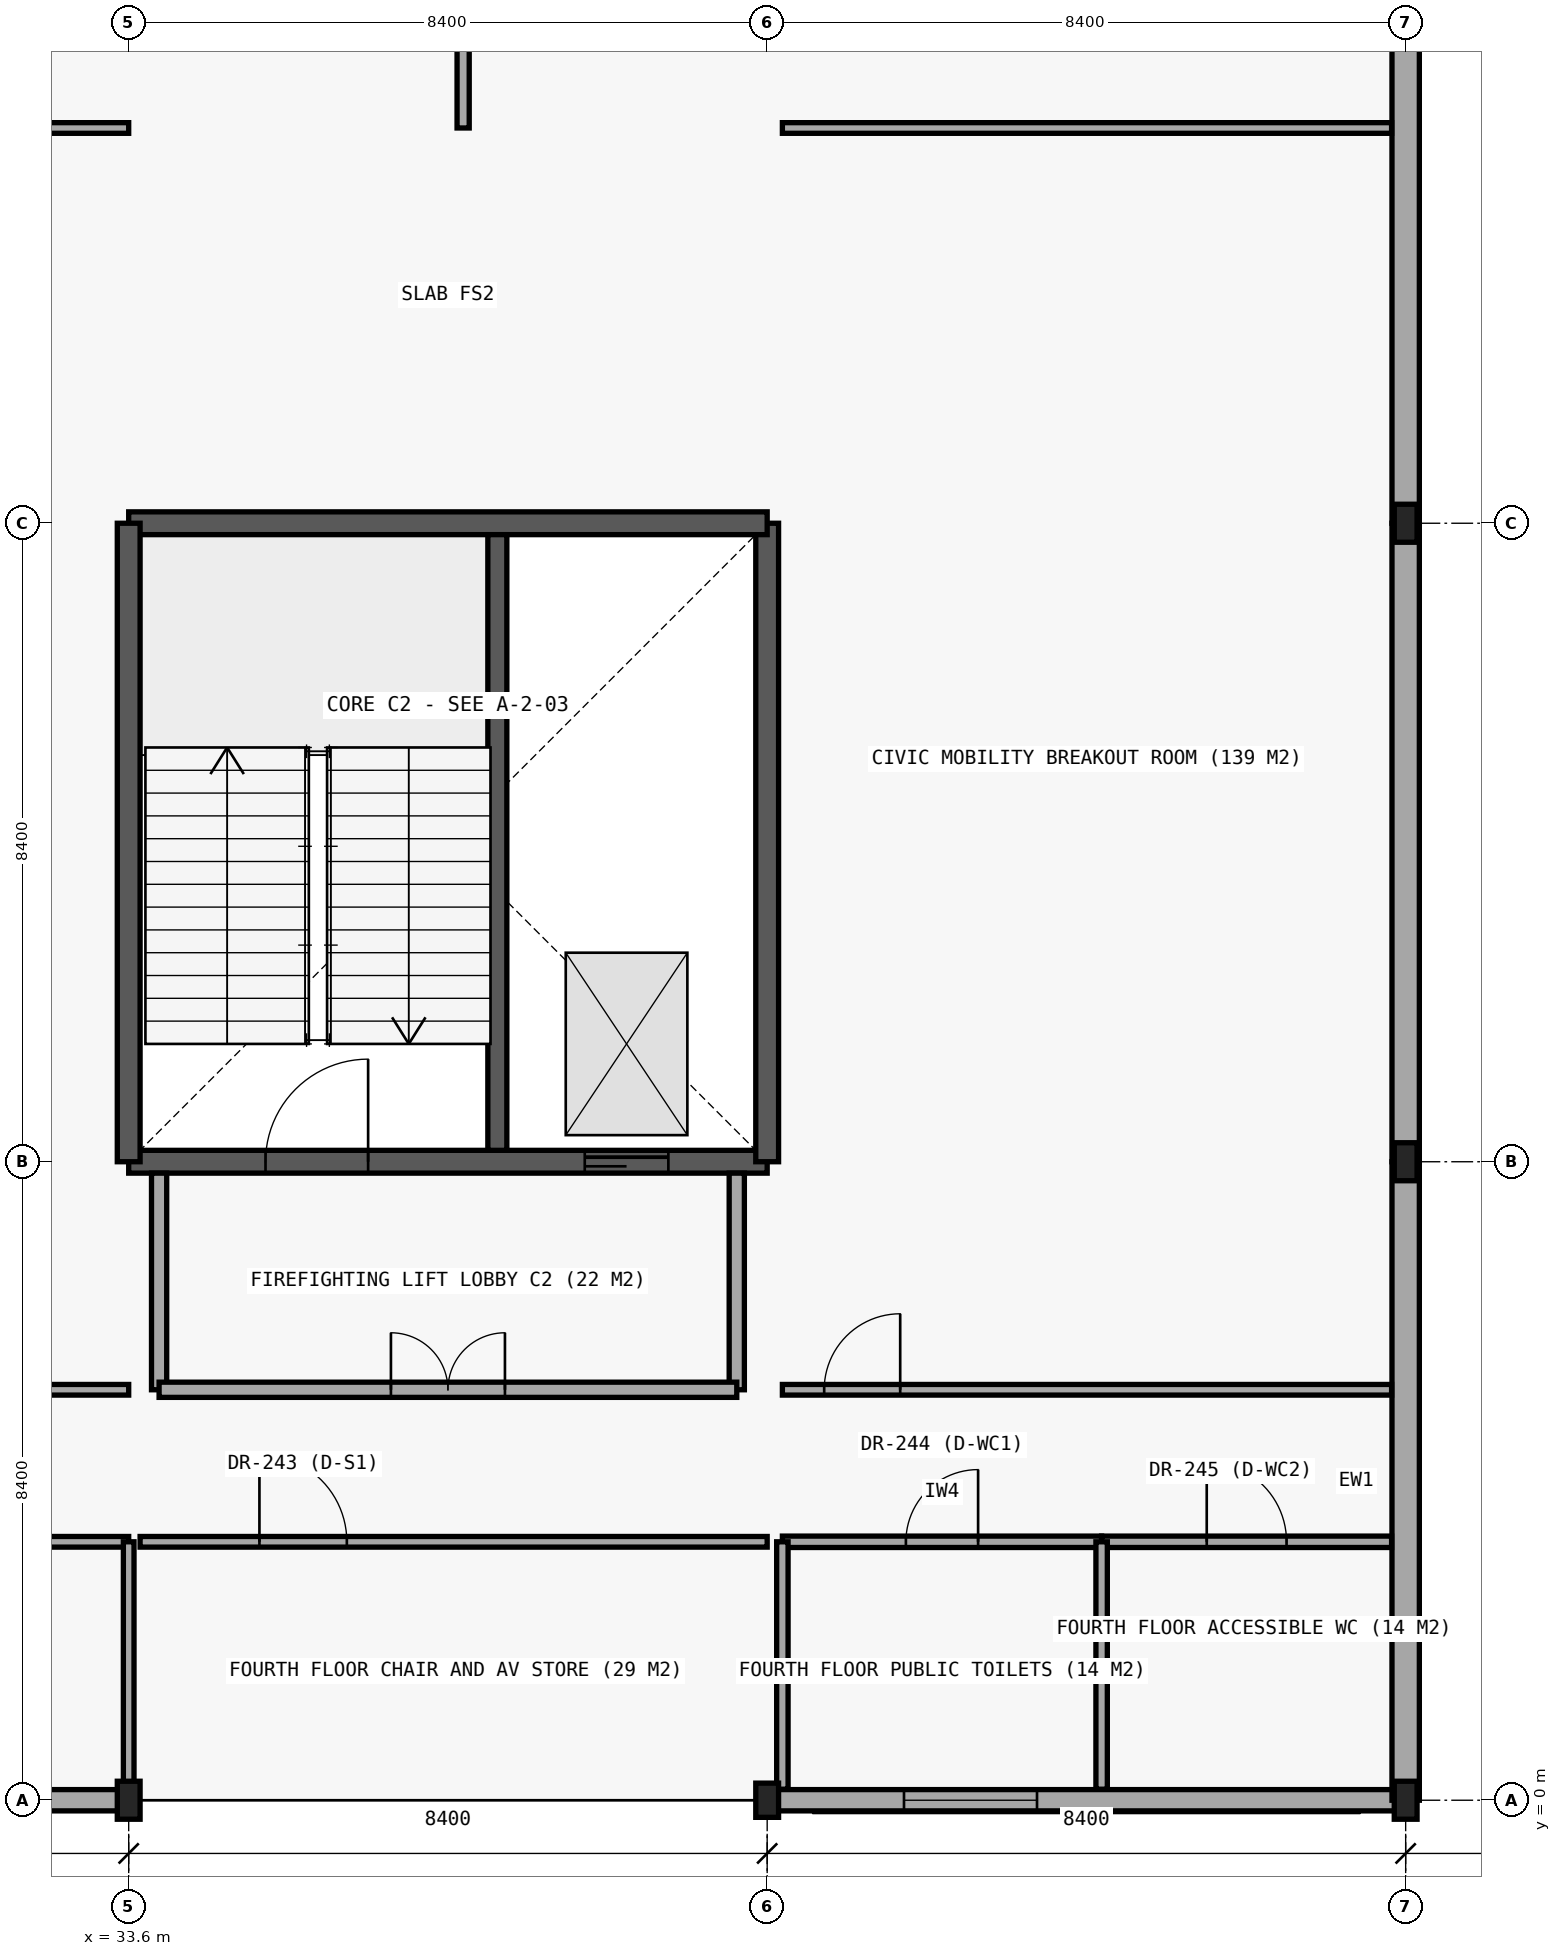
"""IFC4 building model, lengths in metres.
Left out: names, types, materials, properties, quantities, classifications, styles, units other than length and angle.
Written with IfcOpenShell. Run it as: python <this file> out.ifc"""

import sys

from ifc_helpers import new_model, si_unit, direction, frame, frame_2d, origin, origin_2d, place, context, subcontext, project, spatial, rectangle, i_section, extrude, element, fill, save


model = new_model("IFC4")
c1 = context("Model", 3, precision=1e-05, world=origin(), true_north=direction((0.0, 1.0)))
c2 = subcontext(c1, "Body", "Model", "MODEL_VIEW")
j1 = project(units=[si_unit("LENGTHUNIT", "METRE"), si_unit("PLANEANGLEUNIT", "RADIAN")], contexts=[c1])
p1 = place(None, origin())
s1 = spatial("IfcSite", under=j1, at=p1, CompositionType="ELEMENT")
p2 = place(p1, origin())
s2 = spatial("IfcBuilding", under=s1, at=p2, CompositionType="ELEMENT")
p3 = place(p2, frame((0.0, 0.0, 17.4)))
s3 = spatial("IfcBuildingStorey", under=s2, at=p3, CompositionType="ELEMENT", Elevation=17.4)
p4 = place(p3, frame((33.6, 8.4, 0.0), z_axis=(0.0, 0.0, 1.0), x_axis=(1.0, 0.0, 0.0)))
e1 = element("IfcWall", 1, at=p4, inside=s3, PredefinedType="SHEAR", context=c2, shape_type="SweptSolid", body=[
    extrude(rectangle(XDim=8.4, YDim=0.3, at=frame_2d((4.2, 0.0))), origin(), (0.0, 0.0, 1.0), 4.2),
])
p5 = place(p4, frame((1.8, 0.0, 0.0)))
e2 = element("IfcOpeningElement", 2, at=p5, cuts=e1, PredefinedType="OPENING", context=c2, shape_type="SweptSolid", body=[
    extrude(rectangle(XDim=1.35, YDim=2.2, at=frame_2d((0.675, 1.1))), frame((0.0, 0.16, 0.0), z_axis=(0.0, -1.0, 0.0), x_axis=(1.0, 0.0, 0.0)), (0.0, 0.0, 1.0), 0.32),
])
p6 = place(p4, frame((6.0, 0.0, 0.0)))
e3 = element("IfcOpeningElement", 3, at=p6, cuts=e1, PredefinedType="OPENING", context=c2, shape_type="SweptSolid", body=[
    extrude(rectangle(XDim=1.1, YDim=2.2, at=frame_2d((0.55, 1.1))), frame((0.0, 0.16, 0.0), z_axis=(0.0, -1.0, 0.0), x_axis=(1.0, 0.0, 0.0)), (0.0, 0.0, 1.0), 0.32),
])
p7 = place(p3, frame((42.0, 8.4, 0.0), z_axis=(0.0, 0.0, 1.0), x_axis=(0.0, 1.0, 0.0)))
e4 = element("IfcWall", 4, at=p7, inside=s3, PredefinedType="SHEAR", context=c2, shape_type="SweptSolid", body=[
    extrude(rectangle(XDim=8.4, YDim=0.3, at=frame_2d((4.2, 0.0))), origin(), (0.0, 0.0, 1.0), 4.2),
])
p8 = place(p3, frame((42.0, 16.8, 0.0), z_axis=(0.0, 0.0, 1.0), x_axis=(-1.0, 0.0, 0.0)))
e5 = element("IfcWall", 5, at=p8, inside=s3, PredefinedType="SHEAR", context=c2, shape_type="SweptSolid", body=[
    extrude(rectangle(XDim=8.4, YDim=0.3, at=frame_2d((4.2, 0.0))), origin(), (0.0, 0.0, 1.0), 4.2),
])
p9 = place(p3, frame((33.6, 16.8, 0.0), z_axis=(0.0, 0.0, 1.0), x_axis=(0.0, -1.0, 0.0)))
e6 = element("IfcWall", 6, at=p9, inside=s3, PredefinedType="SHEAR", context=c2, shape_type="SweptSolid", body=[
    extrude(rectangle(XDim=8.4, YDim=0.3, at=frame_2d((4.2, 0.0))), origin(), (0.0, 0.0, 1.0), 4.2),
])
p10 = place(p3, frame((38.45, 8.55, 0.0), z_axis=(0.0, 0.0, 1.0), x_axis=(0.0, 1.0, 0.0)))
e7 = element("IfcWall", 7, at=p10, inside=s3, PredefinedType="SHEAR", context=c2, shape_type="SweptSolid", body=[
    extrude(rectangle(XDim=8.1, YDim=0.25, at=frame_2d((4.05, 0.0))), origin(), (0.0, 0.0, 1.0), 4.2),
])
p11 = place(p3, frame((33.6, 0.0, 0.0), z_axis=(0.0, 0.0, 1.0), x_axis=(1.0, 0.0, 0.0)))
e8 = element("IfcColumn", 8, at=p11, inside=s3, PredefinedType="COLUMN", context=c2, shape_type="SweptSolid", body=[
    extrude(i_section(OverallWidth=0.3, OverallDepth=0.5, WebThickness=0.014, FlangeThickness=0.028, FilletRadius=0.027, at=origin_2d()), origin(), (0.0, 0.0, 1.0), 4.2),
])
p12 = place(p3, frame((42.0, 0.0, 0.0), z_axis=(0.0, 0.0, 1.0), x_axis=(1.0, 0.0, 0.0)))
e9 = element("IfcColumn", 9, at=p12, inside=s3, PredefinedType="COLUMN", context=c2, shape_type="SweptSolid", body=[
    extrude(i_section(OverallWidth=0.3, OverallDepth=0.45, WebThickness=0.014, FlangeThickness=0.026, FilletRadius=0.027, at=origin_2d()), origin(), (0.0, 0.0, 1.0), 4.2),
])
for number, where, z_axis, x_axis in (
    (10, (50.4, 0.0, 0.0), (0.0, 0.0, 1.0), (1.0, 0.0, 0.0)),
    (11, (50.4, 8.4, 0.0), (0.0, 0.0, 1.0), (1.0, 0.0, 0.0)),
    (12, (50.4, 16.8, 0.0), (0.0, 0.0, 1.0), (1.0, 0.0, 0.0)),
):
    element("IfcColumn", number, at=place(p3, frame(where, z_axis=z_axis, x_axis=x_axis)), inside=s3, PredefinedType="COLUMN", context=c2, shape_type="SweptSolid", body=[
        extrude(i_section(OverallWidth=0.3, OverallDepth=0.5, WebThickness=0.014, FlangeThickness=0.028, FilletRadius=0.027, at=origin_2d()), origin(), (0.0, 0.0, 1.0), 3.958),
    ])
p13 = place(p3, frame((25.2, 0.0, 0.0), z_axis=(0.0, 0.0, 1.0), x_axis=(1.0, 0.0, 0.0)))
e13 = element("IfcWall", 13, at=p13, inside=s3, PredefinedType="STANDARD", context=c2, shape_type="SweptSolid", body=[
    extrude(rectangle(XDim=8.4, YDim=0.28, at=frame_2d((4.2, 0.0))), origin(), (0.0, 0.0, 1.0), 3.62),
])
p14 = place(p3, frame((42.0, 0.0, 0.0), z_axis=(0.0, 0.0, 1.0), x_axis=(1.0, 0.0, 0.0)))
e14 = element("IfcWall", 14, at=p14, inside=s3, PredefinedType="STANDARD", context=c2, shape_type="SweptSolid", body=[
    extrude(rectangle(XDim=8.4, YDim=0.28, at=frame_2d((4.2, 0.0))), origin(), (0.0, 0.0, 1.0), 3.62),
])
p15 = place(p14, frame((1.8, 0.0, 0.85)))
e15 = element("IfcOpeningElement", 15, at=p15, cuts=e14, PredefinedType="OPENING", context=c2, shape_type="SweptSolid", body=[
    extrude(rectangle(XDim=1.75, YDim=2.45, at=frame_2d((0.875, 1.225))), frame((0.0, 0.15, 0.0), z_axis=(0.0, -1.0, 0.0), x_axis=(1.0, 0.0, 0.0)), (0.0, 0.0, 1.0), 0.3),
])
p16 = place(p3, frame((50.4, 0.0, 0.0), z_axis=(0.0, 0.0, 1.0), x_axis=(0.0, 1.0, 0.0)))
e16 = element("IfcWall", 16, at=p16, inside=s3, PredefinedType="STANDARD", context=c2, shape_type="SweptSolid", body=[
    extrude(rectangle(XDim=8.4, YDim=0.36, at=frame_2d((4.2, 0.0))), origin(), (0.0, 0.0, 1.0), 3.62),
])
p17 = place(p3, frame((50.4, 8.4, 0.0), z_axis=(0.0, 0.0, 1.0), x_axis=(0.0, 1.0, 0.0)))
e17 = element("IfcWall", 17, at=p17, inside=s3, PredefinedType="STANDARD", context=c2, shape_type="SweptSolid", body=[
    extrude(rectangle(XDim=8.4, YDim=0.36, at=frame_2d((4.2, 0.0))), origin(), (0.0, 0.0, 1.0), 3.62),
])
p18 = place(p3, frame((50.4, 16.8, 0.0), z_axis=(0.0, 0.0, 1.0), x_axis=(0.0, 1.0, 0.0)))
e18 = element("IfcWall", 18, at=p18, inside=s3, PredefinedType="STANDARD", context=c2, shape_type="SweptSolid", body=[
    extrude(rectangle(XDim=8.4, YDim=0.36, at=frame_2d((4.2, 0.0))), origin(), (0.0, 0.0, 1.0), 3.62),
])
p19 = place(p3, frame((34.0, 5.4, 0.0), z_axis=(0.0, 0.0, 1.0), x_axis=(0.0, 1.0, 0.0)))
e19 = element("IfcWall", 19, at=p19, inside=s3, PredefinedType="PARTITIONING", context=c2, shape_type="SweptSolid", body=[
    extrude(rectangle(XDim=2.85, YDim=0.2, at=frame_2d((1.425, 0.0))), origin(), (0.0, 0.0, 1.0), 3.49),
])
p20 = place(p3, frame((41.6, 5.4, 0.0), z_axis=(0.0, 0.0, 1.0), x_axis=(0.0, 1.0, 0.0)))
e20 = element("IfcWall", 20, at=p20, inside=s3, PredefinedType="PARTITIONING", context=c2, shape_type="SweptSolid", body=[
    extrude(rectangle(XDim=2.85, YDim=0.2, at=frame_2d((1.425, 0.0))), origin(), (0.0, 0.0, 1.0), 3.52),
])
p21 = place(p3, frame((34.0, 5.4, 0.0), z_axis=(0.0, 0.0, 1.0), x_axis=(1.0, 0.0, 0.0)))
e21 = element("IfcWall", 21, at=p21, inside=s3, PredefinedType="PARTITIONING", context=c2, shape_type="SweptSolid", body=[
    extrude(rectangle(XDim=7.6, YDim=0.2, at=frame_2d((3.8, 0.0))), origin(), (0.0, 0.0, 1.0), 3.52),
])
p22 = place(p21, frame((3.05, 0.0, 0.0)))
e22 = element("IfcOpeningElement", 22, at=p22, cuts=e21, PredefinedType="OPENING", context=c2, shape_type="SweptSolid", body=[
    extrude(rectangle(XDim=1.5, YDim=2.2, at=frame_2d((0.75, 1.1))), frame((0.0, 0.11, 0.0), z_axis=(0.0, -1.0, 0.0), x_axis=(1.0, 0.0, 0.0)), (0.0, 0.0, 1.0), 0.22),
])
p23 = place(p3, frame((19.8, 3.4, 0.0), z_axis=(0.0, 0.0, 1.0), x_axis=(1.0, 0.0, 0.0)))
e23 = element("IfcWall", 23, at=p23, inside=s3, PredefinedType="PARTITIONING", context=c2, shape_type="SweptSolid", body=[
    extrude(rectangle(XDim=13.8, YDim=0.14, at=frame_2d((6.9, 0.0))), origin(), (0.0, 0.0, 1.0), 3.5),
])
p24 = place(p23, frame((7.87, 0.0, 0.0)))
e24 = element("IfcOpeningElement", 24, at=p24, cuts=e23, PredefinedType="OPENING", context=c2, shape_type="SweptSolid", body=[
    extrude(rectangle(XDim=1.0, YDim=2.15, at=frame_2d((0.5, 1.075))), frame((0.0, 0.08, 0.0), z_axis=(0.0, -1.0, 0.0), x_axis=(1.0, 0.0, 0.0)), (0.0, 0.0, 1.0), 0.16),
])
p25 = place(p3, frame((33.75, 3.4, 0.0), z_axis=(0.0, 0.0, 1.0), x_axis=(1.0, 0.0, 0.0)))
e25 = element("IfcWall", 25, at=p25, inside=s3, PredefinedType="PARTITIONING", context=c2, shape_type="SweptSolid", body=[
    extrude(rectangle(XDim=8.25, YDim=0.14, at=frame_2d((4.125, 0.0))), origin(), (0.0, 0.0, 1.0), 3.5),
])
p26 = place(p25, frame((1.57, 0.0, 0.0)))
e26 = element("IfcOpeningElement", 26, at=p26, cuts=e25, PredefinedType="OPENING", context=c2, shape_type="SweptSolid", body=[
    extrude(rectangle(XDim=1.15, YDim=2.15, at=frame_2d((0.575, 1.075))), frame((0.0, 0.08, 0.0), z_axis=(0.0, -1.0, 0.0), x_axis=(1.0, 0.0, 0.0)), (0.0, 0.0, 1.0), 0.16),
])
p27 = place(p3, frame((42.2, 3.4, 0.0), z_axis=(0.0, 0.0, 1.0), x_axis=(1.0, 0.0, 0.0)))
e27 = element("IfcWall", 27, at=p27, inside=s3, PredefinedType="PARTITIONING", context=c2, shape_type="SweptSolid", body=[
    extrude(rectangle(XDim=4.2, YDim=0.15, at=frame_2d((2.1, 0.0))), origin(), (0.0, 0.0, 1.0), 3.5),
])
p28 = place(p27, frame((1.625, 0.0, 0.0)))
e28 = element("IfcOpeningElement", 28, at=p28, cuts=e27, PredefinedType="OPENING", context=c2, shape_type="SweptSolid", body=[
    extrude(rectangle(XDim=0.95, YDim=2.1, at=frame_2d((0.475, 1.05))), frame((0.0, 0.085, 0.0), z_axis=(0.0, -1.0, 0.0), x_axis=(1.0, 0.0, 0.0)), (0.0, 0.0, 1.0), 0.17),
])
p29 = place(p3, frame((46.4, 3.4, 0.0), z_axis=(0.0, 0.0, 1.0), x_axis=(1.0, 0.0, 0.0)))
e29 = element("IfcWall", 29, at=p29, inside=s3, PredefinedType="PARTITIONING", context=c2, shape_type="SweptSolid", body=[
    extrude(rectangle(XDim=3.815, YDim=0.15, at=frame_2d((1.908, 0.0))), origin(), (0.0, 0.0, 1.0), 3.5),
])
p30 = place(p29, frame((1.383, 0.0, 0.0)))
e30 = element("IfcOpeningElement", 30, at=p30, cuts=e29, PredefinedType="OPENING", context=c2, shape_type="SweptSolid", body=[
    extrude(rectangle(XDim=1.05, YDim=2.15, at=frame_2d((0.525, 1.075))), frame((0.0, 0.085, 0.0), z_axis=(0.0, -1.0, 0.0), x_axis=(1.0, 0.0, 0.0)), (0.0, 0.0, 1.0), 0.17),
])
p31 = place(p3, frame((22.2, 5.4, 0.0), z_axis=(0.0, 0.0, 1.0), x_axis=(1.0, 0.0, 0.0)))
e31 = element("IfcWall", 31, at=p31, inside=s3, PredefinedType="PARTITIONING", context=c2, shape_type="SweptSolid", body=[
    extrude(rectangle(XDim=11.4, YDim=0.14, at=frame_2d((5.7, 0.0))), origin(), (0.0, 0.0, 1.0), 3.5),
])
p32 = place(p3, frame((42.2, 5.4, 0.0), z_axis=(0.0, 0.0, 1.0), x_axis=(1.0, 0.0, 0.0)))
e32 = element("IfcWall", 32, at=p32, inside=s3, PredefinedType="PARTITIONING", context=c2, shape_type="SweptSolid", body=[
    extrude(rectangle(XDim=8.015, YDim=0.14, at=frame_2d((4.008, 0.0))), origin(), (0.0, 0.0, 1.0), 3.5),
])
p33 = place(p32, frame((0.55, 0.0, 0.0)))
e33 = element("IfcOpeningElement", 33, at=p33, cuts=e32, PredefinedType="OPENING", context=c2, shape_type="SweptSolid", body=[
    extrude(rectangle(XDim=1.0, YDim=2.15, at=frame_2d((0.5, 1.075))), frame((0.0, 0.08, 0.0), z_axis=(0.0, -1.0, 0.0), x_axis=(1.0, 0.0, 0.0)), (0.0, 0.0, 1.0), 0.16),
])
p34 = place(p3, frame((26.0, 22.0, 0.0), z_axis=(0.0, 0.0, 1.0), x_axis=(1.0, 0.0, 0.0)))
e34 = element("IfcWall", 34, at=p34, inside=s3, PredefinedType="PARTITIONING", context=c2, shape_type="SweptSolid", body=[
    extrude(rectangle(XDim=7.6, YDim=0.14, at=frame_2d((3.8, 0.0))), origin(), (0.0, 0.0, 1.0), 3.5),
])
p35 = place(p3, frame((42.2, 22.0, 0.0), z_axis=(0.0, 0.0, 1.0), x_axis=(1.0, 0.0, 0.0)))
e35 = element("IfcWall", 35, at=p35, inside=s3, PredefinedType="PARTITIONING", context=c2, shape_type="SweptSolid", body=[
    extrude(rectangle(XDim=8.015, YDim=0.14, at=frame_2d((4.008, 0.0))), origin(), (0.0, 0.0, 1.0), 3.5),
])
p36 = place(p3, frame((33.6, 0.145, 0.0), z_axis=(0.0, 0.0, 1.0), x_axis=(0.0, 1.0, 0.0)))
e36 = element("IfcWall", 36, at=p36, inside=s3, PredefinedType="PARTITIONING", context=c2, shape_type="SweptSolid", body=[
    extrude(rectangle(XDim=3.255, YDim=0.14, at=frame_2d((1.627, 0.0))), origin(), (0.0, 0.0, 1.0), 3.49),
])
p37 = place(p3, frame((38.0, 22.0, 0.0), z_axis=(0.0, 0.0, 1.0), x_axis=(0.0, 1.0, 0.0)))
e37 = element("IfcWall", 37, at=p37, inside=s3, PredefinedType="PARTITIONING", context=c2, shape_type="SweptSolid", body=[
    extrude(rectangle(XDim=19.955, YDim=0.16, at=frame_2d((9.978, 0.0))), origin(), (0.0, 0.0, 1.0), 3.5),
])
p38 = place(p37, frame((9.277, 0.0, 0.0)))
e38 = element("IfcOpeningElement", 38, at=p38, cuts=e37, PredefinedType="OPENING", context=c2, shape_type="SweptSolid", body=[
    extrude(rectangle(XDim=1.4, YDim=2.25, at=frame_2d((0.7, 1.125))), frame((0.0, 0.09, 0.0), z_axis=(0.0, -1.0, 0.0), x_axis=(1.0, 0.0, 0.0)), (0.0, 0.0, 1.0), 0.18),
])
for number, where, z_axis, x_axis in (
    (39, (42.2, 0.145, 0.0), (0.0, 0.0, 1.0), (0.0, 1.0, 0.0)),
    (40, (46.4, 0.145, 0.0), (0.0, 0.0, 1.0), (0.0, 1.0, 0.0)),
):
    element("IfcWall", number, at=place(p3, frame(where, z_axis=z_axis, x_axis=x_axis)), inside=s3, PredefinedType="PARTITIONING", context=c2, shape_type="SweptSolid", body=[
        extrude(rectangle(XDim=3.255, YDim=0.15, at=frame_2d((1.627, 0.0))), origin(), (0.0, 0.0, 1.0), 3.5),
    ])
p39 = place(p15, origin())
e41 = element("IfcWindow", 41, at=p39, inside=s3, PartitioningType="SINGLE_PANEL", PredefinedType="WINDOW", context=c2, shape_type="SweptSolid", body=[
    extrude(rectangle(XDim=1.75, YDim=2.45, at=frame_2d((0.875, 1.225))), frame((0.0, 0.03, 0.0), z_axis=(0.0, -1.0, 0.0), x_axis=(1.0, 0.0, 0.0)), (0.0, 0.0, 1.0), 0.06),
])
fill(e15, e41)
p40 = place(p5, origin())
e42 = element("IfcDoor", 42, at=p40, inside=s3, OperationType="SINGLE_SWING_RIGHT", PredefinedType="DOOR", context=c2, shape_type="SweptSolid", body=[
    extrude(rectangle(XDim=1.35, YDim=2.2, at=frame_2d((0.675, 1.1))), frame((0.0, 0.025, 0.0), z_axis=(0.0, -1.0, 0.0), x_axis=(1.0, 0.0, 0.0)), (0.0, 0.0, 1.0), 0.05),
])
fill(e2, e42)
p41 = place(p6, origin())
e43 = element("IfcDoor", 43, at=p41, inside=s3, OperationType="SLIDING_TO_LEFT", PredefinedType="DOOR", context=c2, shape_type="SweptSolid", body=[
    extrude(rectangle(XDim=1.1, YDim=2.2, at=frame_2d((0.55, 1.1))), frame((0.0, 0.025, 0.0), z_axis=(0.0, -1.0, 0.0), x_axis=(1.0, 0.0, 0.0)), (0.0, 0.0, 1.0), 0.05),
])
fill(e3, e43)
p42 = place(p22, origin())
e44 = element("IfcDoor", 44, at=p42, inside=s3, OperationType="DOUBLE_DOOR_SINGLE_SWING", PredefinedType="DOOR", context=c2, shape_type="SweptSolid", body=[
    extrude(rectangle(XDim=1.5, YDim=2.2, at=frame_2d((0.75, 1.1))), frame((0.0, 0.025, 0.0), z_axis=(0.0, -1.0, 0.0), x_axis=(1.0, 0.0, 0.0)), (0.0, 0.0, 1.0), 0.05),
])
fill(e22, e44)
p43 = place(p26, origin())
e45 = element("IfcDoor", 45, at=p43, inside=s3, OperationType="SINGLE_SWING_LEFT", PredefinedType="DOOR", context=c2, shape_type="SweptSolid", body=[
    extrude(rectangle(XDim=1.15, YDim=2.15, at=frame_2d((0.575, 1.075))), frame((0.0, 0.025, 0.0), z_axis=(0.0, -1.0, 0.0), x_axis=(1.0, 0.0, 0.0)), (0.0, 0.0, 1.0), 0.05),
])
fill(e26, e45)
p44 = place(p28, origin())
e46 = element("IfcDoor", 46, at=p44, inside=s3, OperationType="SINGLE_SWING_RIGHT", PredefinedType="DOOR", context=c2, shape_type="SweptSolid", body=[
    extrude(rectangle(XDim=0.95, YDim=2.1, at=frame_2d((0.475, 1.05))), frame((0.0, 0.025, 0.0), z_axis=(0.0, -1.0, 0.0), x_axis=(1.0, 0.0, 0.0)), (0.0, 0.0, 1.0), 0.05),
])
fill(e28, e46)
p45 = place(p30, origin())
e47 = element("IfcDoor", 47, at=p45, inside=s3, OperationType="SINGLE_SWING_LEFT", PredefinedType="DOOR", context=c2, shape_type="SweptSolid", body=[
    extrude(rectangle(XDim=1.05, YDim=2.15, at=frame_2d((0.525, 1.075))), frame((0.0, 0.025, 0.0), z_axis=(0.0, -1.0, 0.0), x_axis=(1.0, 0.0, 0.0)), (0.0, 0.0, 1.0), 0.05),
])
fill(e30, e47)
p46 = place(p33, origin())
e48 = element("IfcDoor", 48, at=p46, inside=s3, OperationType="SINGLE_SWING_RIGHT", PredefinedType="DOOR", context=c2, shape_type="SweptSolid", body=[
    extrude(rectangle(XDim=1.0, YDim=2.15, at=frame_2d((0.5, 1.075))), frame((0.0, 0.025, 0.0), z_axis=(0.0, -1.0, 0.0), x_axis=(1.0, 0.0, 0.0)), (0.0, 0.0, 1.0), 0.05),
])
fill(e33, e48)
save(model, sys.argv[1])
